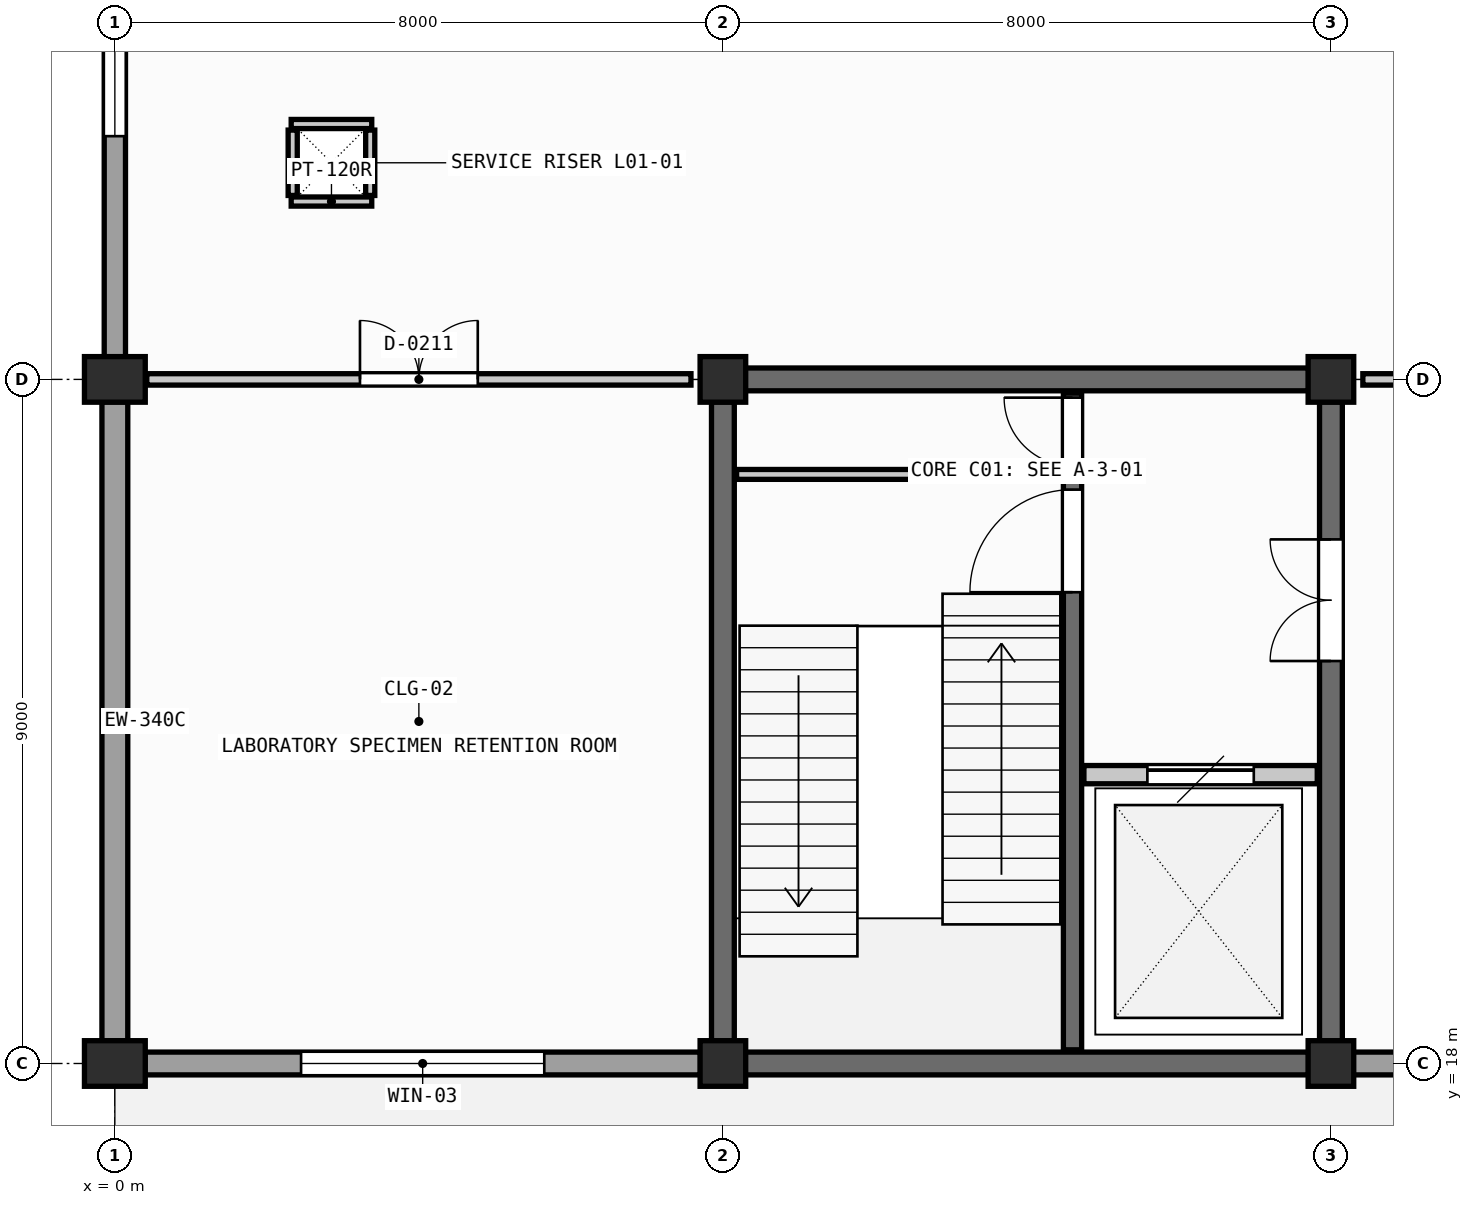
"""IFC4 building model, lengths in metres.
Left out: names, types, materials, properties, quantities, classifications, styles, units other than length and angle.
Written with IfcOpenShell. Run it as: python <this file> out.ifc"""

import sys

from ifc_helpers import new_model, si_unit, direction, frame, frame_2d, origin, origin_2d, place, context, subcontext, project, spatial, rectangle, extrude, element, fill, save


model = new_model("IFC4")
c1 = context("Model", 3, precision=1e-05, world=origin(), true_north=direction((0.0, 1.0)))
c2 = subcontext(c1, "Body", "Model", "MODEL_VIEW")
j1 = project(units=[si_unit("LENGTHUNIT", "METRE"), si_unit("PLANEANGLEUNIT", "RADIAN")], contexts=[c1])
p1 = place(None, origin())
s1 = spatial("IfcSite", under=j1, at=p1, CompositionType="ELEMENT")
p2 = place(p1, origin())
s2 = spatial("IfcBuilding", under=s1, at=p2, CompositionType="ELEMENT")
p3 = place(p2, frame((0.0, 0.0, 4.8)))
s3 = spatial("IfcBuildingStorey", under=s2, at=p3, CompositionType="ELEMENT", Elevation=4.8)
for number, where, z_axis, x_axis in (
    (1, (0.0, 18.0, 0.0), (0.0, 0.0, 1.0), (1.0, 0.0, 0.0)),
    (2, (0.0, 27.0, 0.0), (0.0, 0.0, 1.0), (1.0, 0.0, 0.0)),
):
    element("IfcColumn", number, at=place(p3, frame(where, z_axis=z_axis, x_axis=x_axis)), inside=s3, PredefinedType="COLUMN", context=c2, shape_type="SweptSolid", body=[
        extrude(rectangle(XDim=0.8, YDim=0.6, at=origin_2d()), origin(), (0.0, 0.0, 1.0), 4.2),
    ])
for number, where, z_axis, x_axis in (
    (3, (8.0, 18.0, 0.0), (0.0, 0.0, 1.0), (1.0, 0.0, 0.0)),
    (4, (8.0, 27.0, 0.0), (0.0, 0.0, 1.0), (1.0, 0.0, 0.0)),
    (5, (16.0, 18.0, 0.0), (0.0, 0.0, 1.0), (1.0, 0.0, 0.0)),
    (6, (16.0, 27.0, 0.0), (0.0, 0.0, 1.0), (1.0, 0.0, 0.0)),
):
    element("IfcColumn", number, at=place(p3, frame(where, z_axis=z_axis, x_axis=x_axis)), inside=s3, PredefinedType="COLUMN", context=c2, shape_type="SweptSolid", body=[
        extrude(rectangle(XDim=0.6, YDim=0.6, at=origin_2d()), origin(), (0.0, 0.0, 1.0), 4.2),
    ])
for number, where, z_axis, x_axis in (
    (7, (2.32, 29.34, 0.0), (0.0, 0.0, 1.0), (1.0, 0.0, 0.0)),
    (8, (2.32, 30.36, 0.0), (0.0, 0.0, 1.0), (1.0, 0.0, 0.0)),
):
    element("IfcWall", number, at=place(p3, frame(where, z_axis=z_axis, x_axis=x_axis)), inside=s3, PredefinedType="PARTITIONING", context=c2, shape_type="SweptSolid", body=[
        extrude(rectangle(XDim=1.06, YDim=0.12, at=frame_2d((0.53, 0.0))), origin(), (0.0, 0.0, 1.0), 2.95),
    ])
for number, where, z_axis, x_axis in (
    (9, (2.34, 29.42, 0.0), (0.0, 0.0, 1.0), (0.0, 1.0, 0.0)),
    (10, (3.36, 29.42, 0.0), (0.0, 0.0, 1.0), (0.0, 1.0, 0.0)),
):
    element("IfcWall", number, at=place(p3, frame(where, z_axis=z_axis, x_axis=x_axis)), inside=s3, PredefinedType="PARTITIONING", context=c2, shape_type="SweptSolid", body=[
        extrude(rectangle(XDim=0.86, YDim=0.12, at=frame_2d((0.43, 0.0))), origin(), (0.0, 0.0, 1.0), 2.95),
    ])
p4 = place(p3, frame((0.395, 18.0, 0.0), z_axis=(0.0, 0.0, 1.0), x_axis=(1.0, 0.0, 0.0)))
e11 = element("IfcWall", 11, at=p4, inside=s3, PredefinedType="SOLIDWALL", context=c2, shape_type="SweptSolid", body=[
    extrude(rectangle(XDim=7.31, YDim=0.3, at=frame_2d((3.655, 0.0))), origin(), (0.0, 0.0, 1.0), 3.05),
])
p5 = place(p4, frame((2.055, 0.0, 1.0)))
e12 = element("IfcOpeningElement", 12, at=p5, cuts=e11, PredefinedType="OPENING", context=c2, shape_type="SweptSolid", body=[
    extrude(rectangle(XDim=3.2, YDim=1.65, at=frame_2d((1.6, 0.825))), frame((0.0, 0.16, 0.0), z_axis=(0.0, -1.0, 0.0), x_axis=(1.0, 0.0, 0.0)), (0.0, 0.0, 1.0), 0.32),
])
p6 = place(p3, frame((16.295, 18.0, 0.0), z_axis=(0.0, 0.0, 1.0), x_axis=(1.0, 0.0, 0.0)))
e13 = element("IfcWall", 13, at=p6, inside=s3, PredefinedType="SOLIDWALL", context=c2, shape_type="SweptSolid", body=[
    extrude(rectangle(XDim=7.41, YDim=0.3, at=frame_2d((3.705, 0.0))), origin(), (0.0, 0.0, 1.0), 3.05),
])
p7 = place(p6, frame((2.205, 0.0, 1.0)))
e14 = element("IfcOpeningElement", 14, at=p7, cuts=e13, PredefinedType="OPENING", context=c2, shape_type="SweptSolid", body=[
    extrude(rectangle(XDim=3.0, YDim=1.65, at=frame_2d((1.5, 0.825))), frame((0.0, 0.16, 0.0), z_axis=(0.0, -1.0, 0.0), x_axis=(1.0, 0.0, 0.0)), (0.0, 0.0, 1.0), 0.32),
])
p8 = place(p3, frame((0.0, 26.705, 0.0), z_axis=(0.0, 0.0, 1.0), x_axis=(0.0, -1.0, 0.0)))
e15 = element("IfcWall", 15, at=p8, inside=s3, PredefinedType="SOLIDWALL", context=c2, shape_type="SweptSolid", body=[
    extrude(rectangle(XDim=8.41, YDim=0.34, at=frame_2d((4.205, 0.0))), origin(), (0.0, 0.0, 1.0), 3.05),
])
p9 = place(p3, frame((0.0, 35.705, 0.0), z_axis=(0.0, 0.0, 1.0), x_axis=(0.0, -1.0, 0.0)))
e16 = element("IfcWall", 16, at=p9, inside=s3, PredefinedType="SOLIDWALL", context=c2, shape_type="SweptSolid", body=[
    extrude(rectangle(XDim=8.41, YDim=0.28, at=frame_2d((4.205, 0.0))), origin(), (0.0, 0.0, 1.0), 3.05),
])
p10 = place(p9, frame((2.905, 0.0, 1.0)))
e17 = element("IfcOpeningElement", 17, at=p10, cuts=e16, PredefinedType="OPENING", context=c2, shape_type="SweptSolid", body=[
    extrude(rectangle(XDim=2.6, YDim=1.6, at=frame_2d((1.3, 0.8))), frame((0.0, 0.15, 0.0), z_axis=(0.0, -1.0, 0.0), x_axis=(1.0, 0.0, 0.0)), (0.0, 0.0, 1.0), 0.3),
])
for number, where, z_axis, x_axis in (
    (18, (8.295, 18.0, 0.0), (0.0, 0.0, 1.0), (1.0, 0.0, 0.0)),
    (19, (8.295, 27.0, 0.0), (0.0, 0.0, 1.0), (1.0, 0.0, 0.0)),
):
    element("IfcWall", number, at=place(p3, frame(where, z_axis=z_axis, x_axis=x_axis)), inside=s3, PredefinedType="SHEAR", context=c2, shape_type="SweptSolid", body=[
        extrude(rectangle(XDim=7.41, YDim=0.3, at=frame_2d((3.705, 0.0))), origin(), (0.0, 0.0, 1.0), 3.895),
    ])
p11 = place(p3, frame((8.0, 18.295, 0.0), z_axis=(0.0, 0.0, 1.0), x_axis=(0.0, 1.0, 0.0)))
e20 = element("IfcWall", 20, at=p11, inside=s3, PredefinedType="SHEAR", context=c2, shape_type="SweptSolid", body=[
    extrude(rectangle(XDim=8.41, YDim=0.3, at=frame_2d((4.205, 0.0))), origin(), (0.0, 0.0, 1.0), 3.895),
])
p12 = place(p3, frame((16.0, 18.295, 0.0), z_axis=(0.0, 0.0, 1.0), x_axis=(0.0, 1.0, 0.0)))
e21 = element("IfcWall", 21, at=p12, inside=s3, PredefinedType="SHEAR", context=c2, shape_type="SweptSolid", body=[
    extrude(rectangle(XDim=8.41, YDim=0.3, at=frame_2d((4.205, 0.0))), origin(), (0.0, 0.0, 1.0), 3.895),
])
p13 = place(p12, frame((5.0, 0.0, 0.0)))
e22 = element("IfcOpeningElement", 22, at=p13, cuts=e21, PredefinedType="OPENING", context=c2, shape_type="SweptSolid", body=[
    extrude(rectangle(XDim=1.6, YDim=2.2, at=frame_2d((0.8, 1.1))), frame((0.0, 0.16, 0.0), z_axis=(0.0, -1.0, 0.0), x_axis=(1.0, 0.0, 0.0)), (0.0, 0.0, 1.0), 0.32),
])
p14 = place(p3, frame((12.6, 18.18, 0.0), z_axis=(0.0, 0.0, 1.0), x_axis=(0.0, 1.0, 0.0)))
e23 = element("IfcWall", 23, at=p14, inside=s3, PredefinedType="SHEAR", context=c2, shape_type="SweptSolid", body=[
    extrude(rectangle(XDim=8.64, YDim=0.24, at=frame_2d((4.32, 0.0))), origin(), (0.0, 0.0, 1.0), 3.895),
])
p15 = place(p14, frame((6.02, 0.0, 0.0)))
e24 = element("IfcOpeningElement", 24, at=p15, cuts=e23, PredefinedType="OPENING", context=c2, shape_type="SweptSolid", body=[
    extrude(rectangle(XDim=1.35, YDim=2.2, at=frame_2d((0.675, 1.1))), frame((0.0, 0.13, 0.0), z_axis=(0.0, -1.0, 0.0), x_axis=(1.0, 0.0, 0.0)), (0.0, 0.0, 1.0), 0.26),
])
p16 = place(p14, frame((7.68, 0.0, 0.0)))
e25 = element("IfcOpeningElement", 25, at=p16, cuts=e23, PredefinedType="OPENING", context=c2, shape_type="SweptSolid", body=[
    extrude(rectangle(XDim=0.9, YDim=2.05, at=frame_2d((0.45, 1.025))), frame((0.0, 0.13, 0.0), z_axis=(0.0, -1.0, 0.0), x_axis=(1.0, 0.0, 0.0)), (0.0, 0.0, 1.0), 0.26),
])
p17 = place(p3, frame((8.18, 25.75, 0.0), z_axis=(0.0, 0.0, 1.0), x_axis=(1.0, 0.0, 0.0)))
e26 = element("IfcWall", 26, at=p17, inside=s3, PredefinedType="PARTITIONING", context=c2, shape_type="SweptSolid", body=[
    extrude(rectangle(XDim=4.28, YDim=0.13, at=frame_2d((2.14, 0.0))), origin(), (0.0, 0.0, 1.0), 3.245),
])
p18 = place(p3, frame((12.75, 21.8, 0.0), z_axis=(0.0, 0.0, 1.0), x_axis=(1.0, 0.0, 0.0)))
e27 = element("IfcWall", 27, at=p18, inside=s3, PredefinedType="SHEAR", context=c2, shape_type="SweptSolid", body=[
    extrude(rectangle(XDim=3.07, YDim=0.24, at=frame_2d((1.535, 0.0))), origin(), (0.0, 0.0, 1.0), 3.245),
])
p19 = place(p18, frame((0.835, 0.0, 0.0)))
e28 = element("IfcOpeningElement", 28, at=p19, cuts=e27, PredefinedType="OPENING", context=c2, shape_type="SweptSolid", body=[
    extrude(rectangle(XDim=1.4, YDim=2.3, at=frame_2d((0.7, 1.15))), frame((0.0, 0.13, 0.0), z_axis=(0.0, -1.0, 0.0), x_axis=(1.0, 0.0, 0.0)), (0.0, 0.0, 1.0), 0.26),
])
p20 = place(p3, frame((0.42, 27.0, 0.0), z_axis=(0.0, 0.0, 1.0), x_axis=(1.0, 0.0, 0.0)))
e29 = element("IfcWall", 29, at=p20, inside=s3, PredefinedType="PARTITIONING", context=c2, shape_type="SweptSolid", body=[
    extrude(rectangle(XDim=7.16, YDim=0.15, at=frame_2d((3.58, 0.0))), origin(), (0.0, 0.0, 1.0), 3.05),
])
p21 = place(p20, frame((2.805, 0.0, 0.0)))
e30 = element("IfcOpeningElement", 30, at=p21, cuts=e29, PredefinedType="OPENING", context=c2, shape_type="SweptSolid", body=[
    extrude(rectangle(XDim=1.55, YDim=2.2, at=frame_2d((0.775, 1.1))), frame((0.0, 0.085, 0.0), z_axis=(0.0, -1.0, 0.0), x_axis=(1.0, 0.0, 0.0)), (0.0, 0.0, 1.0), 0.17),
])
p22 = place(p3, frame((16.42, 27.0, 0.0), z_axis=(0.0, 0.0, 1.0), x_axis=(1.0, 0.0, 0.0)))
e31 = element("IfcWall", 31, at=p22, inside=s3, PredefinedType="PARTITIONING", context=c2, shape_type="SweptSolid", body=[
    extrude(rectangle(XDim=3.52, YDim=0.15, at=frame_2d((1.76, 0.0))), origin(), (0.0, 0.0, 1.0), 3.05),
])
p23 = place(p22, frame((1.16, 0.0, 0.0)))
e32 = element("IfcOpeningElement", 32, at=p23, cuts=e31, PredefinedType="OPENING", context=c2, shape_type="SweptSolid", body=[
    extrude(rectangle(XDim=1.2, YDim=2.15, at=frame_2d((0.6, 1.075))), frame((0.0, 0.085, 0.0), z_axis=(0.0, -1.0, 0.0), x_axis=(1.0, 0.0, 0.0)), (0.0, 0.0, 1.0), 0.17),
])
p24 = place(p5, origin())
e33 = element("IfcWindow", 33, at=p24, inside=s3, PartitioningType="SINGLE_PANEL", PredefinedType="WINDOW", context=c2, shape_type="SweptSolid", body=[
    extrude(rectangle(XDim=3.2, YDim=1.65, at=frame_2d((1.6, 0.825))), frame((0.0, 0.03, 0.0), z_axis=(0.0, -1.0, 0.0), x_axis=(1.0, 0.0, 0.0)), (0.0, 0.0, 1.0), 0.06),
])
fill(e12, e33)
p25 = place(p10, origin())
e34 = element("IfcWindow", 34, at=p25, inside=s3, PartitioningType="SINGLE_PANEL", PredefinedType="WINDOW", context=c2, shape_type="SweptSolid", body=[
    extrude(rectangle(XDim=2.6, YDim=1.6, at=frame_2d((1.3, 0.8))), frame((0.0, 0.03, 0.0), z_axis=(0.0, -1.0, 0.0), x_axis=(1.0, 0.0, 0.0)), (0.0, 0.0, 1.0), 0.06),
])
fill(e17, e34)
p26 = place(p15, origin())
e35 = element("IfcDoor", 35, at=p26, inside=s3, OperationType="SINGLE_SWING_LEFT", PredefinedType="DOOR", context=c2, shape_type="SweptSolid", body=[
    extrude(rectangle(XDim=1.35, YDim=2.2, at=frame_2d((0.675, 1.1))), frame((0.0, 0.025, 0.0), z_axis=(0.0, -1.0, 0.0), x_axis=(1.0, 0.0, 0.0)), (0.0, 0.0, 1.0), 0.05),
])
fill(e24, e35)
p27 = place(p16, origin())
e36 = element("IfcDoor", 36, at=p27, inside=s3, OperationType="SINGLE_SWING_RIGHT", PredefinedType="DOOR", context=c2, shape_type="SweptSolid", body=[
    extrude(rectangle(XDim=0.9, YDim=2.05, at=frame_2d((0.45, 1.025))), frame((0.0, 0.025, 0.0), z_axis=(0.0, -1.0, 0.0), x_axis=(1.0, 0.0, 0.0)), (0.0, 0.0, 1.0), 0.05),
])
fill(e25, e36)
p28 = place(p13, origin())
e37 = element("IfcDoor", 37, at=p28, inside=s3, OperationType="DOUBLE_DOOR_SINGLE_SWING", PredefinedType="DOOR", context=c2, shape_type="SweptSolid", body=[
    extrude(rectangle(XDim=1.6, YDim=2.2, at=frame_2d((0.8, 1.1))), frame((0.0, 0.025, 0.0), z_axis=(0.0, -1.0, 0.0), x_axis=(1.0, 0.0, 0.0)), (0.0, 0.0, 1.0), 0.05),
])
fill(e22, e37)
p29 = place(p19, origin())
e38 = element("IfcDoor", 38, at=p29, inside=s3, OperationType="SLIDING_TO_LEFT", PredefinedType="DOOR", context=c2, shape_type="SweptSolid", body=[
    extrude(rectangle(XDim=1.4, YDim=2.3, at=frame_2d((0.7, 1.15))), frame((0.0, 0.025, 0.0), z_axis=(0.0, -1.0, 0.0), x_axis=(1.0, 0.0, 0.0)), (0.0, 0.0, 1.0), 0.05),
])
fill(e28, e38)
p30 = place(p21, origin())
e39 = element("IfcDoor", 39, at=p30, inside=s3, OperationType="DOUBLE_DOOR_SINGLE_SWING", PredefinedType="DOOR", context=c2, shape_type="SweptSolid", body=[
    extrude(rectangle(XDim=1.55, YDim=2.2, at=frame_2d((0.775, 1.1))), frame((0.0, 0.025, 0.0), z_axis=(0.0, -1.0, 0.0), x_axis=(1.0, 0.0, 0.0)), (0.0, 0.0, 1.0), 0.05),
])
fill(e30, e39)
save(model, sys.argv[1])
